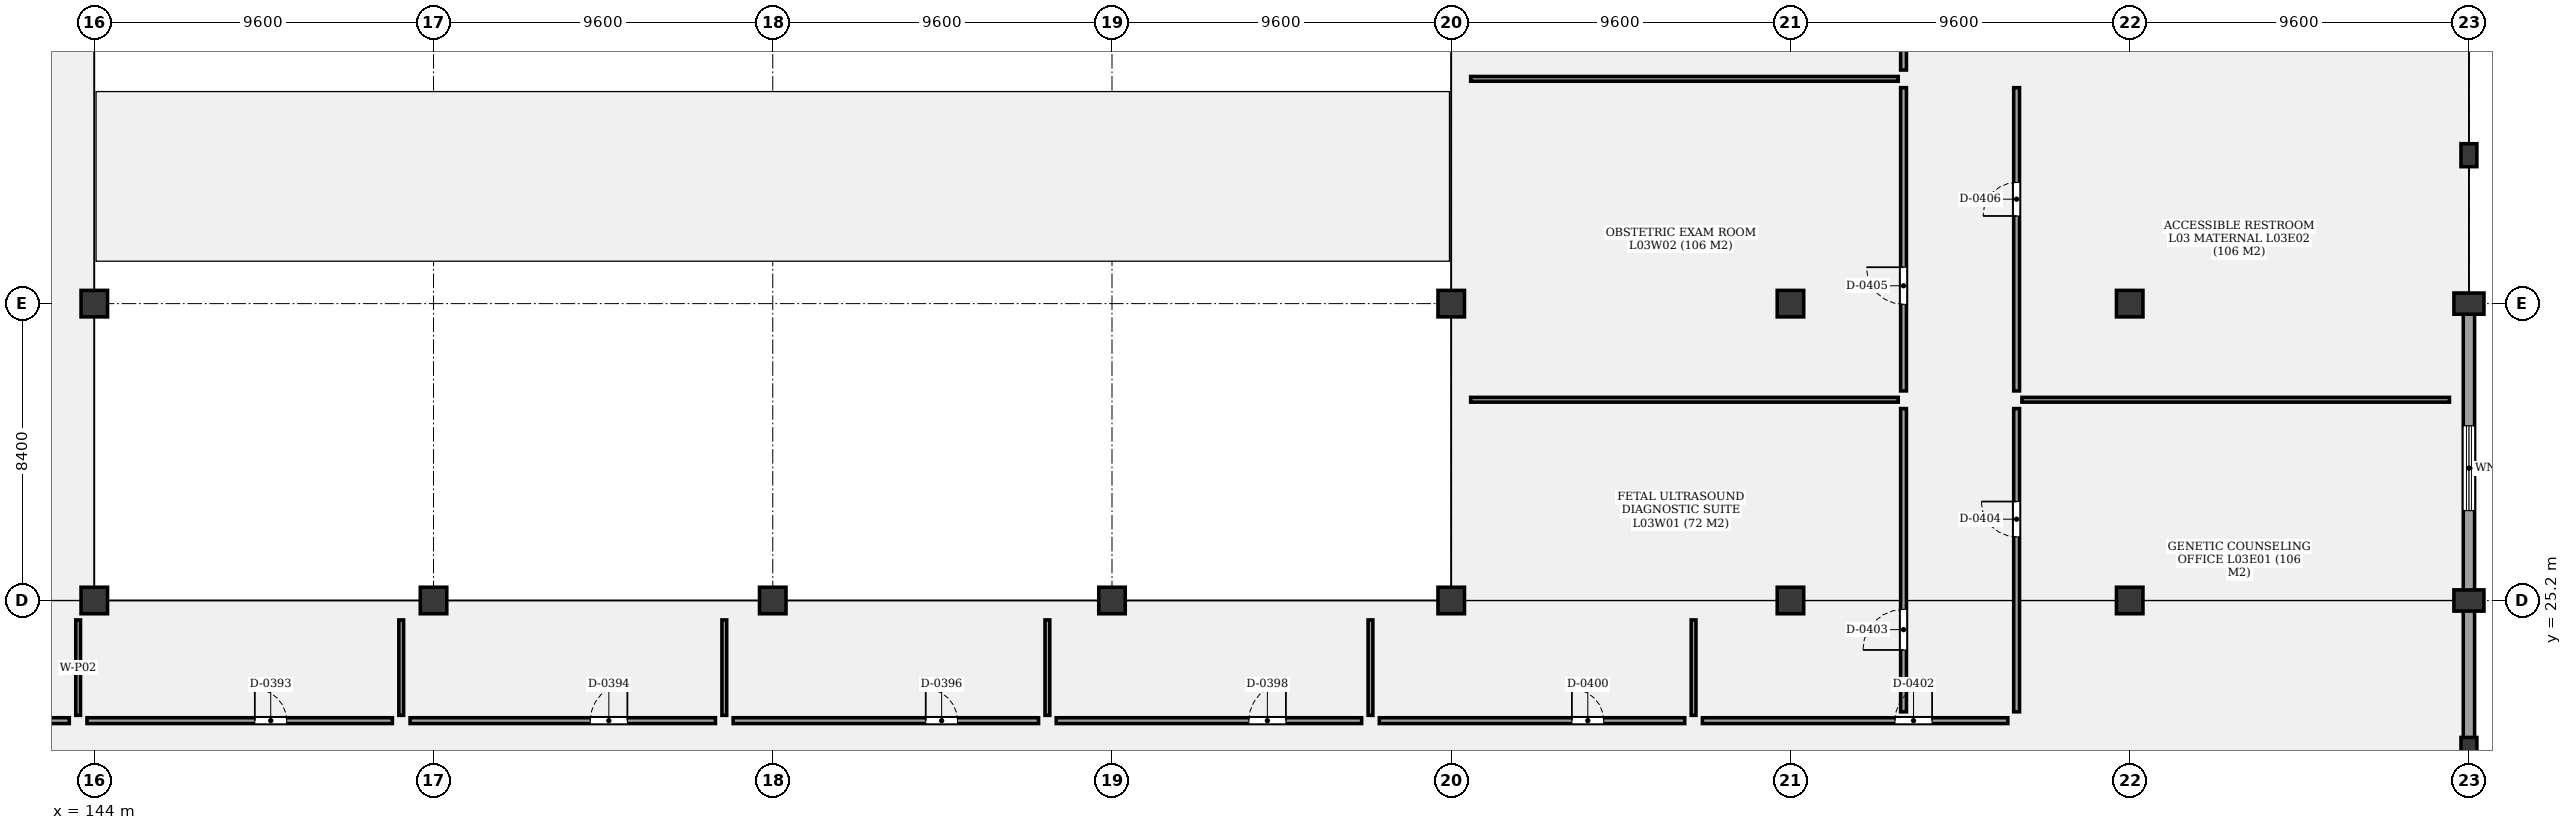
"""IFC4 building model, lengths in metres.
Left out: names, types, materials, properties, quantities, classifications, styles, units other than length and angle.
Written with IfcOpenShell. Run it as: python <this file> out.ifc"""

import sys

from ifc_helpers import new_model, si_unit, direction, frame, frame_2d, origin, origin_2d, place, context, subcontext, project, spatial, rectangle, extrude, element, fill, save


model = new_model("IFC4")
c1 = context("Model", 3, precision=1e-05, world=origin(), true_north=direction((0.0, 1.0)))
c2 = subcontext(c1, "Body", "Model", "MODEL_VIEW")
j1 = project(units=[si_unit("LENGTHUNIT", "METRE"), si_unit("PLANEANGLEUNIT", "RADIAN")], contexts=[c1])
p1 = place(None, origin())
s1 = spatial("IfcSite", under=j1, at=p1, CompositionType="ELEMENT")
p2 = place(p1, origin())
s2 = spatial("IfcBuilding", under=s1, at=p2, CompositionType="ELEMENT")
p3 = place(p2, frame((0.0, 0.0, 13.5)))
s3 = spatial("IfcBuildingStorey", under=s2, at=p3, CompositionType="ELEMENT", Elevation=13.5)
for number, where, z_axis, x_axis in (
    (1, (144.0, 25.2, 0.0), (0.0, 0.0, 1.0), (1.0, 0.0, 0.0)),
    (2, (144.0, 33.6, 0.0), (0.0, 0.0, 1.0), (1.0, 0.0, 0.0)),
    (3, (153.6, 25.2, 0.0), (0.0, 0.0, 1.0), (1.0, 0.0, 0.0)),
    (4, (163.2, 25.2, 0.0), (0.0, 0.0, 1.0), (1.0, 0.0, 0.0)),
    (5, (172.8, 25.2, 0.0), (0.0, 0.0, 1.0), (1.0, 0.0, 0.0)),
    (6, (182.4, 25.2, 0.0), (0.0, 0.0, 1.0), (1.0, 0.0, 0.0)),
    (7, (182.4, 33.6, 0.0), (0.0, 0.0, 1.0), (1.0, 0.0, 0.0)),
    (8, (192.0, 25.2, 0.0), (0.0, 0.0, 1.0), (1.0, 0.0, 0.0)),
    (9, (192.0, 33.6, 0.0), (0.0, 0.0, 1.0), (1.0, 0.0, 0.0)),
    (10, (201.6, 25.2, 0.0), (0.0, 0.0, 1.0), (1.0, 0.0, 0.0)),
    (11, (201.6, 33.6, 0.0), (0.0, 0.0, 1.0), (1.0, 0.0, 0.0)),
):
    element("IfcColumn", number, at=place(p3, frame(where, z_axis=z_axis, x_axis=x_axis)), inside=s3, PredefinedType="COLUMN", context=c2, shape_type="SweptSolid", body=[
        extrude(rectangle(XDim=0.75, YDim=0.75, at=origin_2d()), origin(), (0.0, 0.0, 1.0), 4.3),
    ])
for number, where, z_axis, x_axis in (
    (12, (211.2, 25.2, 0.0), (0.0, 0.0, 1.0), (1.0, 0.0, 0.0)),
    (13, (211.2, 33.6, 0.0), (0.0, 0.0, 1.0), (1.0, 0.0, 0.0)),
):
    element("IfcColumn", number, at=place(p3, frame(where, z_axis=z_axis, x_axis=x_axis)), inside=s3, PredefinedType="COLUMN", context=c2, shape_type="SweptSolid", body=[
        extrude(rectangle(XDim=0.85, YDim=0.6, at=origin_2d()), origin(), (0.0, 0.0, 1.0), 4.3),
    ])
for number, where, z_axis, x_axis in (
    (14, (211.2, 21.0, 0.0), (0.0, 0.0, 1.0), (1.0, 0.0, 0.0)),
    (15, (211.2, 37.8, 0.0), (0.0, 0.0, 1.0), (1.0, 0.0, 0.0)),
):
    element("IfcColumn", number, at=place(p3, frame(where, z_axis=z_axis, x_axis=x_axis)), inside=s3, PredefinedType="PILASTER", context=c2, shape_type="SweptSolid", body=[
        extrude(rectangle(XDim=0.45, YDim=0.65, at=origin_2d()), origin(), (0.0, 0.0, 1.0), 4.3),
    ])
p4 = place(p3, frame((211.2, 33.6, 0.0), z_axis=(0.0, 0.0, 1.0), x_axis=(0.0, -1.0, 0.0)))
e16 = element("IfcWall", 16, at=p4, inside=s3, PredefinedType="SOLIDWALL", context=c2, shape_type="SweptSolid", body=[
    extrude(rectangle(XDim=16.8, YDim=0.32, at=frame_2d((8.4, 0.0))), origin(), (0.0, 0.0, 1.0), 3.49),
])
p5 = place(p4, frame((3.456, 0.0, 0.85)))
e17 = element("IfcOpeningElement", 17, at=p5, cuts=e16, PredefinedType="OPENING", context=c2, shape_type="SweptSolid", body=[
    extrude(rectangle(XDim=2.4, YDim=1.2, at=frame_2d((1.2, 0.6))), frame((0.0, 0.17, 0.0), z_axis=(0.0, -1.0, 0.0), x_axis=(1.0, 0.0, 0.0)), (0.0, 0.0, 1.0), 0.34),
])
p6 = place(p3, frame((134.65, 21.8, 0.0), z_axis=(0.0, 0.0, 1.0), x_axis=(1.0, 0.0, 0.0)))
e18 = element("IfcWall", 18, at=p6, inside=s3, PredefinedType="PARTITIONING", context=c2, shape_type="SweptSolid", body=[
    extrude(rectangle(XDim=8.643, YDim=0.165, at=frame_2d((4.322, 0.0))), origin(), (0.0, 0.0, 1.0), 3.4),
])
p7 = place(p6, frame((4.75, 0.0, 0.0)))
e19 = element("IfcOpeningElement", 19, at=p7, cuts=e18, PredefinedType="OPENING", context=c2, shape_type="SweptSolid", body=[
    extrude(rectangle(XDim=1.05, YDim=2.1, at=frame_2d((0.525, 1.05))), frame((0.0, 0.093, 0.0), z_axis=(0.0, -1.0, 0.0), x_axis=(1.0, 0.0, 0.0)), (0.0, 0.0, 1.0), 0.185),
])
p8 = place(p3, frame((143.793, 21.8, 0.0), z_axis=(0.0, 0.0, 1.0), x_axis=(1.0, 0.0, 0.0)))
e20 = element("IfcWall", 20, at=p8, inside=s3, PredefinedType="PARTITIONING", context=c2, shape_type="SweptSolid", body=[
    extrude(rectangle(XDim=8.643, YDim=0.165, at=frame_2d((4.322, 0.0))), origin(), (0.0, 0.0, 1.0), 3.4),
])
p9 = place(p8, frame((4.75, 0.0, 0.0)))
e21 = element("IfcOpeningElement", 21, at=p9, cuts=e20, PredefinedType="OPENING", context=c2, shape_type="SweptSolid", body=[
    extrude(rectangle(XDim=0.9, YDim=2.1, at=frame_2d((0.45, 1.05))), frame((0.0, 0.093, 0.0), z_axis=(0.0, -1.0, 0.0), x_axis=(1.0, 0.0, 0.0)), (0.0, 0.0, 1.0), 0.185),
])
p10 = place(p3, frame((143.543, 21.95, 0.0), z_axis=(0.0, 0.0, 1.0), x_axis=(0.0, 1.0, 0.0)))
e22 = element("IfcWall", 22, at=p10, inside=s3, PredefinedType="PARTITIONING", context=c2, shape_type="SweptSolid", body=[
    extrude(rectangle(XDim=2.7, YDim=0.135, at=frame_2d((1.35, 0.0))), origin(), (0.0, 0.0, 1.0), 3.4),
])
p11 = place(p3, frame((152.936, 21.8, 0.0), z_axis=(0.0, 0.0, 1.0), x_axis=(1.0, 0.0, 0.0)))
e23 = element("IfcWall", 23, at=p11, inside=s3, PredefinedType="PARTITIONING", context=c2, shape_type="SweptSolid", body=[
    extrude(rectangle(XDim=8.643, YDim=0.165, at=frame_2d((4.322, 0.0))), origin(), (0.0, 0.0, 1.0), 3.4),
])
p12 = place(p11, frame((5.1, 0.0, 0.0)))
e24 = element("IfcOpeningElement", 24, at=p12, cuts=e23, PredefinedType="OPENING", context=c2, shape_type="SweptSolid", body=[
    extrude(rectangle(XDim=1.05, YDim=2.1, at=frame_2d((0.525, 1.05))), frame((0.0, 0.093, 0.0), z_axis=(0.0, -1.0, 0.0), x_axis=(1.0, 0.0, 0.0)), (0.0, 0.0, 1.0), 0.185),
])
p13 = place(p3, frame((152.686, 21.95, 0.0), z_axis=(0.0, 0.0, 1.0), x_axis=(0.0, 1.0, 0.0)))
e25 = element("IfcWall", 25, at=p13, inside=s3, PredefinedType="PARTITIONING", context=c2, shape_type="SweptSolid", body=[
    extrude(rectangle(XDim=2.7, YDim=0.135, at=frame_2d((1.35, 0.0))), origin(), (0.0, 0.0, 1.0), 3.4),
])
p14 = place(p3, frame((162.079, 21.8, 0.0), z_axis=(0.0, 0.0, 1.0), x_axis=(1.0, 0.0, 0.0)))
e26 = element("IfcWall", 26, at=p14, inside=s3, PredefinedType="PARTITIONING", context=c2, shape_type="SweptSolid", body=[
    extrude(rectangle(XDim=8.643, YDim=0.165, at=frame_2d((4.321, 0.0))), origin(), (0.0, 0.0, 1.0), 3.4),
])
p15 = place(p14, frame((5.45, 0.0, 0.0)))
e27 = element("IfcOpeningElement", 27, at=p15, cuts=e26, PredefinedType="OPENING", context=c2, shape_type="SweptSolid", body=[
    extrude(rectangle(XDim=0.9, YDim=2.1, at=frame_2d((0.45, 1.05))), frame((0.0, 0.093, 0.0), z_axis=(0.0, -1.0, 0.0), x_axis=(1.0, 0.0, 0.0)), (0.0, 0.0, 1.0), 0.185),
])
p16 = place(p3, frame((161.829, 21.95, 0.0), z_axis=(0.0, 0.0, 1.0), x_axis=(0.0, 1.0, 0.0)))
e28 = element("IfcWall", 28, at=p16, inside=s3, PredefinedType="PARTITIONING", context=c2, shape_type="SweptSolid", body=[
    extrude(rectangle(XDim=2.7, YDim=0.135, at=frame_2d((1.35, 0.0))), origin(), (0.0, 0.0, 1.0), 3.4),
])
p17 = place(p3, frame((171.222, 21.8, 0.0), z_axis=(0.0, 0.0, 1.0), x_axis=(1.0, 0.0, 0.0)))
e29 = element("IfcWall", 29, at=p17, inside=s3, PredefinedType="PARTITIONING", context=c2, shape_type="SweptSolid", body=[
    extrude(rectangle(XDim=8.643, YDim=0.165, at=frame_2d((4.322, 0.0))), origin(), (0.0, 0.0, 1.0), 3.4),
])
p18 = place(p17, frame((5.45, 0.0, 0.0)))
e30 = element("IfcOpeningElement", 30, at=p18, cuts=e29, PredefinedType="OPENING", context=c2, shape_type="SweptSolid", body=[
    extrude(rectangle(XDim=1.05, YDim=2.1, at=frame_2d((0.525, 1.05))), frame((0.0, 0.093, 0.0), z_axis=(0.0, -1.0, 0.0), x_axis=(1.0, 0.0, 0.0)), (0.0, 0.0, 1.0), 0.185),
])
p19 = place(p3, frame((170.972, 21.95, 0.0), z_axis=(0.0, 0.0, 1.0), x_axis=(0.0, 1.0, 0.0)))
e31 = element("IfcWall", 31, at=p19, inside=s3, PredefinedType="PARTITIONING", context=c2, shape_type="SweptSolid", body=[
    extrude(rectangle(XDim=2.7, YDim=0.135, at=frame_2d((1.35, 0.0))), origin(), (0.0, 0.0, 1.0), 3.4),
])
p20 = place(p3, frame((180.365, 21.8, 0.0), z_axis=(0.0, 0.0, 1.0), x_axis=(1.0, 0.0, 0.0)))
e32 = element("IfcWall", 32, at=p20, inside=s3, PredefinedType="PARTITIONING", context=c2, shape_type="SweptSolid", body=[
    extrude(rectangle(XDim=8.643, YDim=0.165, at=frame_2d((4.322, 0.0))), origin(), (0.0, 0.0, 1.0), 3.4),
])
p21 = place(p20, frame((5.45, 0.0, 0.0)))
e33 = element("IfcOpeningElement", 33, at=p21, cuts=e32, PredefinedType="OPENING", context=c2, shape_type="SweptSolid", body=[
    extrude(rectangle(XDim=0.9, YDim=2.1, at=frame_2d((0.45, 1.05))), frame((0.0, 0.093, 0.0), z_axis=(0.0, -1.0, 0.0), x_axis=(1.0, 0.0, 0.0)), (0.0, 0.0, 1.0), 0.185),
])
p22 = place(p3, frame((180.115, 21.95, 0.0), z_axis=(0.0, 0.0, 1.0), x_axis=(0.0, 1.0, 0.0)))
e34 = element("IfcWall", 34, at=p22, inside=s3, PredefinedType="PARTITIONING", context=c2, shape_type="SweptSolid", body=[
    extrude(rectangle(XDim=2.7, YDim=0.135, at=frame_2d((1.35, 0.0))), origin(), (0.0, 0.0, 1.0), 3.4),
])
p23 = place(p3, frame((189.508, 21.8, 0.0), z_axis=(0.0, 0.0, 1.0), x_axis=(1.0, 0.0, 0.0)))
e35 = element("IfcWall", 35, at=p23, inside=s3, PredefinedType="PARTITIONING", context=c2, shape_type="SweptSolid", body=[
    extrude(rectangle(XDim=8.643, YDim=0.165, at=frame_2d((4.321, 0.0))), origin(), (0.0, 0.0, 1.0), 3.4),
])
p24 = place(p23, frame((5.45, 0.0, 0.0)))
e36 = element("IfcOpeningElement", 36, at=p24, cuts=e35, PredefinedType="OPENING", context=c2, shape_type="SweptSolid", body=[
    extrude(rectangle(XDim=1.05, YDim=2.1, at=frame_2d((0.525, 1.05))), frame((0.0, 0.093, 0.0), z_axis=(0.0, -1.0, 0.0), x_axis=(1.0, 0.0, 0.0)), (0.0, 0.0, 1.0), 0.185),
])
p25 = place(p3, frame((189.258, 21.95, 0.0), z_axis=(0.0, 0.0, 1.0), x_axis=(0.0, 1.0, 0.0)))
e37 = element("IfcWall", 37, at=p25, inside=s3, PredefinedType="PARTITIONING", context=c2, shape_type="SweptSolid", body=[
    extrude(rectangle(XDim=2.7, YDim=0.135, at=frame_2d((1.35, 0.0))), origin(), (0.0, 0.0, 1.0), 3.4),
])
p26 = place(p3, frame((195.2, 22.05, 0.0), z_axis=(0.0, 0.0, 1.0), x_axis=(0.0, 1.0, 0.0)))
e38 = element("IfcWall", 38, at=p26, inside=s3, PredefinedType="PARTITIONING", context=c2, shape_type="SweptSolid", body=[
    extrude(rectangle(XDim=8.58, YDim=0.165, at=frame_2d((4.29, 0.0))), origin(), (0.0, 0.0, 1.0), 3.4),
])
p27 = place(p26, frame((1.75, 0.0, 0.0)))
e39 = element("IfcOpeningElement", 39, at=p27, cuts=e38, PredefinedType="OPENING", context=c2, shape_type="SweptSolid", body=[
    extrude(rectangle(XDim=1.15, YDim=2.2, at=frame_2d((0.575, 1.1))), frame((0.0, 0.093, 0.0), z_axis=(0.0, -1.0, 0.0), x_axis=(1.0, 0.0, 0.0)), (0.0, 0.0, 1.0), 0.185),
])
p28 = place(p3, frame((198.4, 22.05, 0.0), z_axis=(0.0, 0.0, 1.0), x_axis=(0.0, 1.0, 0.0)))
e40 = element("IfcWall", 40, at=p28, inside=s3, PredefinedType="PARTITIONING", context=c2, shape_type="SweptSolid", body=[
    extrude(rectangle(XDim=8.58, YDim=0.165, at=frame_2d((4.29, 0.0))), origin(), (0.0, 0.0, 1.0), 3.4),
])
p29 = place(p28, frame((4.95, 0.0, 0.0)))
e41 = element("IfcOpeningElement", 41, at=p29, cuts=e40, PredefinedType="OPENING", context=c2, shape_type="SweptSolid", body=[
    extrude(rectangle(XDim=1.0, YDim=2.2, at=frame_2d((0.5, 1.1))), frame((0.0, 0.093, 0.0), z_axis=(0.0, -1.0, 0.0), x_axis=(1.0, 0.0, 0.0)), (0.0, 0.0, 1.0), 0.185),
])
p30 = place(p3, frame((195.2, 31.13, 0.0), z_axis=(0.0, 0.0, 1.0), x_axis=(0.0, 1.0, 0.0)))
e42 = element("IfcWall", 42, at=p30, inside=s3, PredefinedType="PARTITIONING", context=c2, shape_type="SweptSolid", body=[
    extrude(rectangle(XDim=8.58, YDim=0.165, at=frame_2d((4.29, 0.0))), origin(), (0.0, 0.0, 1.0), 3.4),
])
p31 = place(p30, frame((2.45, 0.0, 0.0)))
e43 = element("IfcOpeningElement", 43, at=p31, cuts=e42, PredefinedType="OPENING", context=c2, shape_type="SweptSolid", body=[
    extrude(rectangle(XDim=1.05, YDim=2.1, at=frame_2d((0.525, 1.05))), frame((0.0, 0.093, 0.0), z_axis=(0.0, -1.0, 0.0), x_axis=(1.0, 0.0, 0.0)), (0.0, 0.0, 1.0), 0.185),
])
p32 = place(p3, frame((182.95, 30.88, 0.0), z_axis=(0.0, 0.0, 1.0), x_axis=(1.0, 0.0, 0.0)))
e44 = element("IfcWall", 44, at=p32, inside=s3, PredefinedType="PARTITIONING", context=c2, shape_type="SweptSolid", body=[
    extrude(rectangle(XDim=12.1, YDim=0.135, at=frame_2d((6.05, 0.0))), origin(), (0.0, 0.0, 1.0), 3.4),
])
p33 = place(p3, frame((198.4, 31.13, 0.0), z_axis=(0.0, 0.0, 1.0), x_axis=(0.0, 1.0, 0.0)))
e45 = element("IfcWall", 45, at=p33, inside=s3, PredefinedType="PARTITIONING", context=c2, shape_type="SweptSolid", body=[
    extrude(rectangle(XDim=8.58, YDim=0.165, at=frame_2d((4.29, 0.0))), origin(), (0.0, 0.0, 1.0), 3.4),
])
p34 = place(p33, frame((4.95, 0.0, 0.0)))
e46 = element("IfcOpeningElement", 46, at=p34, cuts=e45, PredefinedType="OPENING", context=c2, shape_type="SweptSolid", body=[
    extrude(rectangle(XDim=0.95, YDim=2.1, at=frame_2d((0.475, 1.05))), frame((0.0, 0.093, 0.0), z_axis=(0.0, -1.0, 0.0), x_axis=(1.0, 0.0, 0.0)), (0.0, 0.0, 1.0), 0.185),
])
p35 = place(p3, frame((198.55, 30.88, 0.0), z_axis=(0.0, 0.0, 1.0), x_axis=(1.0, 0.0, 0.0)))
e47 = element("IfcWall", 47, at=p35, inside=s3, PredefinedType="PARTITIONING", context=c2, shape_type="SweptSolid", body=[
    extrude(rectangle(XDim=12.1, YDim=0.135, at=frame_2d((6.05, 0.0))), origin(), (0.0, 0.0, 1.0), 3.4),
])
p36 = place(p3, frame((195.2, 40.21, 0.0), z_axis=(0.0, 0.0, 1.0), x_axis=(0.0, 1.0, 0.0)))
e48 = element("IfcWall", 48, at=p36, inside=s3, PredefinedType="PARTITIONING", context=c2, shape_type="SweptSolid", body=[
    extrude(rectangle(XDim=8.58, YDim=0.165, at=frame_2d((4.29, 0.0))), origin(), (0.0, 0.0, 1.0), 3.4),
])
p37 = place(p36, frame((2.45, 0.0, 0.0)))
e49 = element("IfcOpeningElement", 49, at=p37, cuts=e48, PredefinedType="OPENING", context=c2, shape_type="SweptSolid", body=[
    extrude(rectangle(XDim=1.15, YDim=2.2, at=frame_2d((0.575, 1.1))), frame((0.0, 0.093, 0.0), z_axis=(0.0, -1.0, 0.0), x_axis=(1.0, 0.0, 0.0)), (0.0, 0.0, 1.0), 0.185),
])
p38 = place(p3, frame((182.95, 39.96, 0.0), z_axis=(0.0, 0.0, 1.0), x_axis=(1.0, 0.0, 0.0)))
e50 = element("IfcWall", 50, at=p38, inside=s3, PredefinedType="PARTITIONING", context=c2, shape_type="SweptSolid", body=[
    extrude(rectangle(XDim=12.1, YDim=0.135, at=frame_2d((6.05, 0.0))), origin(), (0.0, 0.0, 1.0), 3.4),
])
p39 = place(p5, origin())
e51 = element("IfcWindow", 51, at=p39, inside=s3, PartitioningType="SINGLE_PANEL", PredefinedType="WINDOW", context=c2, shape_type="SweptSolid", body=[
    extrude(rectangle(XDim=2.4, YDim=1.2, at=frame_2d((1.2, 0.6))), frame((0.0, 0.03, 0.0), z_axis=(0.0, -1.0, 0.0), x_axis=(1.0, 0.0, 0.0)), (0.0, 0.0, 1.0), 0.06),
])
fill(e17, e51)
p40 = place(p9, origin())
e52 = element("IfcDoor", 52, at=p40, inside=s3, OperationType="SINGLE_SWING_LEFT", PredefinedType="DOOR", context=c2, shape_type="SweptSolid", body=[
    extrude(rectangle(XDim=0.9, YDim=2.1, at=frame_2d((0.45, 1.05))), frame((0.0, 0.025, 0.0), z_axis=(0.0, -1.0, 0.0), x_axis=(1.0, 0.0, 0.0)), (0.0, 0.0, 1.0), 0.05),
])
fill(e21, e52)
p41 = place(p12, origin())
e53 = element("IfcDoor", 53, at=p41, inside=s3, OperationType="SINGLE_SWING_RIGHT", PredefinedType="DOOR", context=c2, shape_type="SweptSolid", body=[
    extrude(rectangle(XDim=1.05, YDim=2.1, at=frame_2d((0.525, 1.05))), frame((0.0, 0.025, 0.0), z_axis=(0.0, -1.0, 0.0), x_axis=(1.0, 0.0, 0.0)), (0.0, 0.0, 1.0), 0.05),
])
fill(e24, e53)
p42 = place(p15, origin())
e54 = element("IfcDoor", 54, at=p42, inside=s3, OperationType="SINGLE_SWING_LEFT", PredefinedType="DOOR", context=c2, shape_type="SweptSolid", body=[
    extrude(rectangle(XDim=0.9, YDim=2.1, at=frame_2d((0.45, 1.05))), frame((0.0, 0.025, 0.0), z_axis=(0.0, -1.0, 0.0), x_axis=(1.0, 0.0, 0.0)), (0.0, 0.0, 1.0), 0.05),
])
fill(e27, e54)
p43 = place(p18, origin())
e55 = element("IfcDoor", 55, at=p43, inside=s3, OperationType="SINGLE_SWING_RIGHT", PredefinedType="DOOR", context=c2, shape_type="SweptSolid", body=[
    extrude(rectangle(XDim=1.05, YDim=2.1, at=frame_2d((0.525, 1.05))), frame((0.0, 0.025, 0.0), z_axis=(0.0, -1.0, 0.0), x_axis=(1.0, 0.0, 0.0)), (0.0, 0.0, 1.0), 0.05),
])
fill(e30, e55)
p44 = place(p21, origin())
e56 = element("IfcDoor", 56, at=p44, inside=s3, OperationType="SINGLE_SWING_LEFT", PredefinedType="DOOR", context=c2, shape_type="SweptSolid", body=[
    extrude(rectangle(XDim=0.9, YDim=2.1, at=frame_2d((0.45, 1.05))), frame((0.0, 0.025, 0.0), z_axis=(0.0, -1.0, 0.0), x_axis=(1.0, 0.0, 0.0)), (0.0, 0.0, 1.0), 0.05),
])
fill(e33, e56)
p45 = place(p24, origin())
e57 = element("IfcDoor", 57, at=p45, inside=s3, OperationType="SINGLE_SWING_RIGHT", PredefinedType="DOOR", context=c2, shape_type="SweptSolid", body=[
    extrude(rectangle(XDim=1.05, YDim=2.1, at=frame_2d((0.525, 1.05))), frame((0.0, 0.025, 0.0), z_axis=(0.0, -1.0, 0.0), x_axis=(1.0, 0.0, 0.0)), (0.0, 0.0, 1.0), 0.05),
])
fill(e36, e57)
p46 = place(p27, origin())
e58 = element("IfcDoor", 58, at=p46, inside=s3, OperationType="SINGLE_SWING_LEFT", PredefinedType="DOOR", context=c2, shape_type="SweptSolid", body=[
    extrude(rectangle(XDim=1.15, YDim=2.2, at=frame_2d((0.575, 1.1))), frame((0.0, 0.025, 0.0), z_axis=(0.0, -1.0, 0.0), x_axis=(1.0, 0.0, 0.0)), (0.0, 0.0, 1.0), 0.05),
])
fill(e39, e58)
p47 = place(p29, origin())
e59 = element("IfcDoor", 59, at=p47, inside=s3, OperationType="SINGLE_SWING_RIGHT", PredefinedType="DOOR", context=c2, shape_type="SweptSolid", body=[
    extrude(rectangle(XDim=1.0, YDim=2.2, at=frame_2d((0.5, 1.1))), frame((0.0, 0.025, 0.0), z_axis=(0.0, -1.0, 0.0), x_axis=(1.0, 0.0, 0.0)), (0.0, 0.0, 1.0), 0.05),
])
fill(e41, e59)
p48 = place(p31, origin())
e60 = element("IfcDoor", 60, at=p48, inside=s3, OperationType="SINGLE_SWING_RIGHT", PredefinedType="DOOR", context=c2, shape_type="SweptSolid", body=[
    extrude(rectangle(XDim=1.05, YDim=2.1, at=frame_2d((0.525, 1.05))), frame((0.0, 0.025, 0.0), z_axis=(0.0, -1.0, 0.0), x_axis=(1.0, 0.0, 0.0)), (0.0, 0.0, 1.0), 0.05),
])
fill(e43, e60)
p49 = place(p34, origin())
e61 = element("IfcDoor", 61, at=p49, inside=s3, OperationType="SINGLE_SWING_LEFT", PredefinedType="DOOR", context=c2, shape_type="SweptSolid", body=[
    extrude(rectangle(XDim=0.95, YDim=2.1, at=frame_2d((0.475, 1.05))), frame((0.0, 0.025, 0.0), z_axis=(0.0, -1.0, 0.0), x_axis=(1.0, 0.0, 0.0)), (0.0, 0.0, 1.0), 0.05),
])
fill(e46, e61)
save(model, sys.argv[1])
